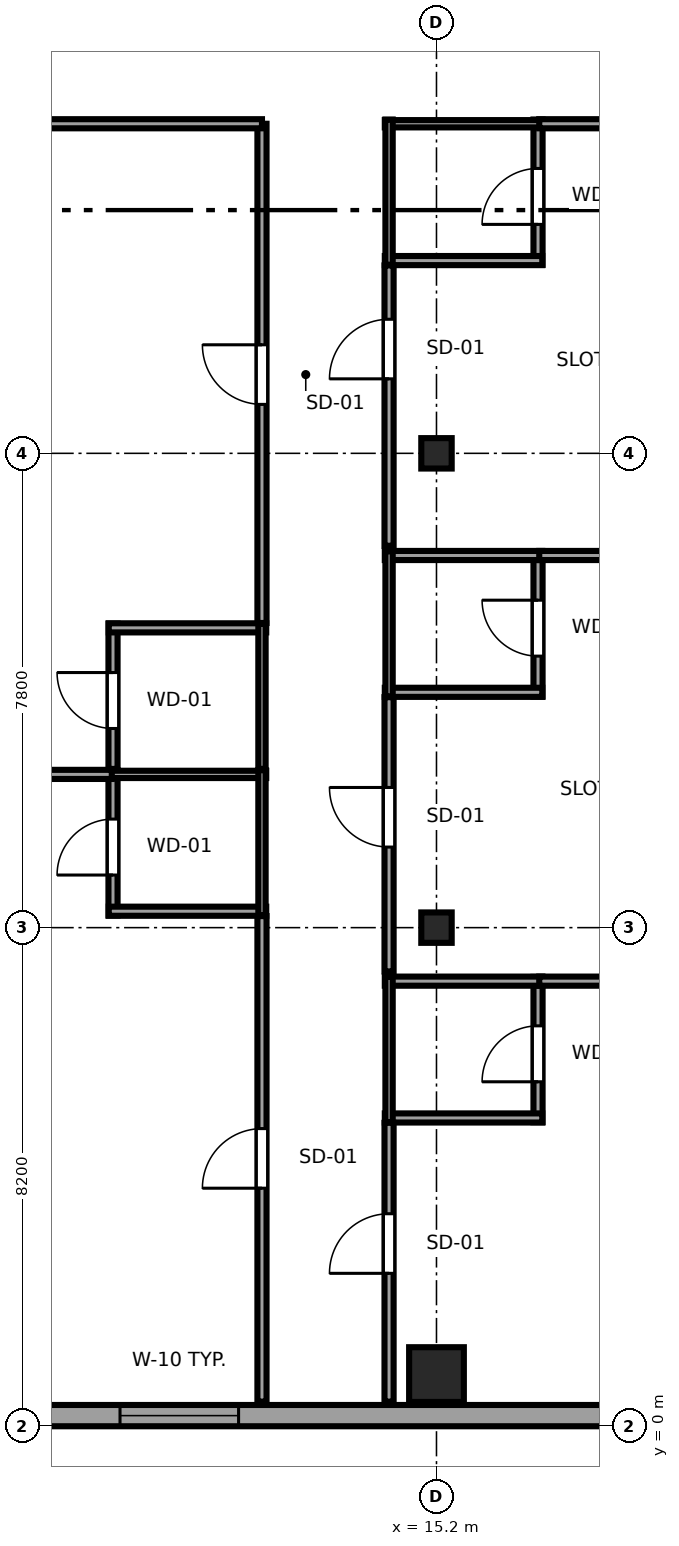
"""IFC4 building model, lengths in metres.
Left out: names, types, materials, properties, quantities, classifications, styles, units other than length and angle.
Written with IfcOpenShell. Run it as: python <this file> out.ifc"""

import sys

from ifc_helpers import new_model, si_unit, direction, frame, frame_2d, origin, origin_2d, place, context, subcontext, project, spatial, rectangle, i_section, extrude, source, transform, mapped, element, fill, save


model = new_model("IFC4")
c1 = context("Model", 3, precision=1e-05, world=origin(), true_north=direction((0.0, 1.0)))
c2 = subcontext(c1, "Body", "Model", "MODEL_VIEW")
j1 = project(units=[si_unit("LENGTHUNIT", "METRE"), si_unit("PLANEANGLEUNIT", "RADIAN")], contexts=[c1])
p1 = place(None, origin())
s1 = spatial("IfcSite", under=j1, at=p1, CompositionType="ELEMENT")
p2 = place(p1, origin())
s2 = spatial("IfcBuilding", under=s1, at=p2, CompositionType="ELEMENT")
p3 = place(p2, frame((0.0, 0.0, 143.5)))
s3 = spatial("IfcBuildingStorey", under=s2, at=p3, CompositionType="ELEMENT", Elevation=143.5)
m1 = source(origin(), c2, "Body", "SweptSolid", [
    extrude(rectangle(XDim=0.9, YDim=0.9, at=origin_2d()), origin(), (0.0, 0.0, 1.0), 3.55),
])
p4 = place(p3, frame((15.2, 0.85, 0.0), z_axis=(0.0, 0.0, 1.0), x_axis=(1.0, 0.0, 0.0)))
e1 = element("IfcColumn", 1, at=p4, inside=s3, PredefinedType="COLUMN", context=c2, shape_type="MappedRepresentation", body=[
    mapped(m1, transform((0.0, 0.0, 0.0), x_axis=(1.0, 0.0, 0.0), y_axis=(0.0, 1.0, 0.0), z_axis=(0.0, 0.0, 1.0), scale=1.0)),
])
m2 = source(origin(), c2, "Body", "SweptSolid", [
    extrude(i_section(OverallWidth=0.5, OverallDepth=0.5, WebThickness=0.022, FlangeThickness=0.034, at=origin_2d()), origin(), (0.0, 0.0, 1.0), 3.55),
])
for number, where, z_axis, x_axis in (
    (2, (15.2, 8.2, 0.0), (0.0, 0.0, 1.0), (1.0, 0.0, 0.0)),
    (3, (15.2, 16.0, 0.0), (0.0, 0.0, 1.0), (1.0, 0.0, 0.0)),
):
    element("IfcColumn", number, at=place(p3, frame(where, z_axis=z_axis, x_axis=x_axis)), inside=s3, PredefinedType="COLUMN", context=c2, shape_type="MappedRepresentation", body=[
        mapped(m2, transform((0.0, 0.0, 0.0), x_axis=(1.0, 0.0, 0.0), y_axis=(0.0, 1.0, 0.0), z_axis=(0.0, 0.0, 1.0), scale=1.0)),
    ])
p5 = place(p3, frame((4.617, 0.175, 0.0), z_axis=(0.0, 0.0, 1.0), x_axis=(1.0, 0.0, 0.0)))
e4 = element("IfcWall", 4, at=p5, inside=s3, PredefinedType="SOLIDWALL", context=c2, shape_type="SweptSolid", body=[
    extrude(rectangle(XDim=18.008, YDim=0.35, at=frame_2d((9.004, 0.0))), origin(), (0.0, 0.0, 1.0), 3.29),
])
p6 = place(p5, frame((5.378, 0.0, 0.68)))
e5 = element("IfcOpeningElement", 5, at=p6, cuts=e4, PredefinedType="OPENING", context=c2, shape_type="SweptSolid", body=[
    extrude(rectangle(XDim=1.95, YDim=1.82, at=frame_2d((0.975, 0.91))), frame((0.0, 0.185, 0.0), z_axis=(0.0, -1.0, 0.0), x_axis=(1.0, 0.0, 0.0)), (0.0, 0.0, 1.0), 0.37),
])
p7 = place(p5, frame((14.332, 0.0, 0.68)))
e6 = element("IfcOpeningElement", 6, at=p7, cuts=e4, PredefinedType="OPENING", context=c2, shape_type="SweptSolid", body=[
    extrude(rectangle(XDim=1.95, YDim=1.82, at=frame_2d((0.975, 0.91))), frame((0.0, 0.185, 0.0), z_axis=(0.0, -1.0, 0.0), x_axis=(1.0, 0.0, 0.0)), (0.0, 0.0, 1.0), 0.37),
])
p8 = place(p3, frame((9.88, 8.4, 0.0), z_axis=(0.0, 0.0, 1.0), x_axis=(0.0, 1.0, 0.0)))
e7 = element("IfcWall", 7, at=p8, inside=s3, PredefinedType="PARTITIONING", context=c2, shape_type="SweptSolid", body=[
    extrude(rectangle(XDim=2.39, YDim=0.15, at=frame_2d((1.195, 0.0))), origin(), (0.0, 0.0, 1.0), 3.29),
])
p9 = place(p8, frame((0.665, 0.0, 0.0)))
e8 = element("IfcOpeningElement", 8, at=p9, cuts=e7, PredefinedType="OPENING", context=c2, shape_type="SweptSolid", body=[
    extrude(rectangle(XDim=0.92, YDim=2.01, at=frame_2d((0.46, 1.005))), frame((0.0, 0.085, 0.0), z_axis=(0.0, -1.0, 0.0), x_axis=(1.0, 0.0, 0.0)), (0.0, 0.0, 1.0), 0.17),
])
p10 = place(p3, frame((9.81, 8.47, 0.0), z_axis=(0.0, 0.0, 1.0), x_axis=(1.0, 0.0, 0.0)))
e9 = element("IfcWall", 9, at=p10, inside=s3, PredefinedType="PARTITIONING", context=c2, shape_type="SweptSolid", body=[
    extrude(rectangle(XDim=2.59, YDim=0.15, at=frame_2d((1.295, 0.0))), origin(), (0.0, 0.0, 1.0), 2.08),
])
p11 = place(p3, frame((9.81, 10.72, 0.0), z_axis=(0.0, 0.0, 1.0), x_axis=(1.0, 0.0, 0.0)))
e10 = element("IfcWall", 10, at=p11, inside=s3, PredefinedType="PLUMBINGWALL", context=c2, shape_type="SweptSolid", body=[
    extrude(rectangle(XDim=2.59, YDim=0.12, at=frame_2d((1.295, 0.0))), origin(), (0.0, 0.0, 1.0), 3.29),
])
p12 = place(p3, frame((12.33, 8.4, 0.0), z_axis=(0.0, 0.0, 1.0), x_axis=(0.0, 1.0, 0.0)))
e11 = element("IfcWall", 11, at=p12, inside=s3, PredefinedType="PLUMBINGWALL", context=c2, shape_type="SweptSolid", body=[
    extrude(rectangle(XDim=2.39, YDim=0.12, at=frame_2d((1.195, 0.0))), origin(), (0.0, 0.0, 1.0), 3.29),
])
p13 = place(p3, frame((9.88, 10.81, 0.0), z_axis=(0.0, 0.0, 1.0), x_axis=(0.0, 1.0, 0.0)))
e12 = element("IfcWall", 12, at=p13, inside=s3, PredefinedType="PARTITIONING", context=c2, shape_type="SweptSolid", body=[
    extrude(rectangle(XDim=2.39, YDim=0.15, at=frame_2d((1.195, 0.0))), origin(), (0.0, 0.0, 1.0), 3.29),
])
p14 = place(p13, frame((0.665, 0.0, 0.0)))
e13 = element("IfcOpeningElement", 13, at=p14, cuts=e12, PredefinedType="OPENING", context=c2, shape_type="SweptSolid", body=[
    extrude(rectangle(XDim=0.92, YDim=2.01, at=frame_2d((0.46, 1.005))), frame((0.0, 0.085, 0.0), z_axis=(0.0, -1.0, 0.0), x_axis=(1.0, 0.0, 0.0)), (0.0, 0.0, 1.0), 0.17),
])
p15 = place(p3, frame((9.81, 13.13, 0.0), z_axis=(0.0, 0.0, 1.0), x_axis=(1.0, 0.0, 0.0)))
e14 = element("IfcWall", 14, at=p15, inside=s3, PredefinedType="PARTITIONING", context=c2, shape_type="SweptSolid", body=[
    extrude(rectangle(XDim=2.59, YDim=0.15, at=frame_2d((1.295, 0.0))), origin(), (0.0, 0.0, 1.0), 3.29),
])
p16 = place(p3, frame((12.33, 10.81, 0.0), z_axis=(0.0, 0.0, 1.0), x_axis=(0.0, 1.0, 0.0)))
e15 = element("IfcWall", 15, at=p16, inside=s3, PredefinedType="PLUMBINGWALL", context=c2, shape_type="SweptSolid", body=[
    extrude(rectangle(XDim=2.39, YDim=0.12, at=frame_2d((1.195, 0.0))), origin(), (0.0, 0.0, 1.0), 3.29),
])
p17 = place(p3, frame((16.87, 5.0, 0.0), z_axis=(0.0, 0.0, 1.0), x_axis=(0.0, 1.0, 0.0)))
e16 = element("IfcWall", 16, at=p17, inside=s3, PredefinedType="PARTITIONING", context=c2, shape_type="SweptSolid", body=[
    extrude(rectangle(XDim=2.39, YDim=0.15, at=frame_2d((1.195, 0.0))), origin(), (0.0, 0.0, 1.0), 3.29),
])
p18 = place(p17, frame((0.665, 0.0, 0.0)))
e17 = element("IfcOpeningElement", 17, at=p18, cuts=e16, PredefinedType="OPENING", context=c2, shape_type="SweptSolid", body=[
    extrude(rectangle(XDim=0.92, YDim=2.01, at=frame_2d((0.46, 1.005))), frame((0.0, 0.085, 0.0), z_axis=(0.0, -1.0, 0.0), x_axis=(1.0, 0.0, 0.0)), (0.0, 0.0, 1.0), 0.17),
])
for number, where, z_axis, x_axis in (
    (18, (14.35, 5.07, 0.0), (0.0, 0.0, 1.0), (1.0, 0.0, 0.0)),
    (19, (14.35, 7.32, 0.0), (0.0, 0.0, 1.0), (1.0, 0.0, 0.0)),
):
    element("IfcWall", number, at=place(p3, frame(where, z_axis=z_axis, x_axis=x_axis)), inside=s3, PredefinedType="PARTITIONING", context=c2, shape_type="SweptSolid", body=[
        extrude(rectangle(XDim=2.59, YDim=0.15, at=frame_2d((1.295, 0.0))), origin(), (0.0, 0.0, 1.0), 3.29),
    ])
p19 = place(p3, frame((14.42, 5.0, 0.0), z_axis=(0.0, 0.0, 1.0), x_axis=(0.0, 1.0, 0.0)))
e20 = element("IfcWall", 20, at=p19, inside=s3, PredefinedType="PLUMBINGWALL", context=c2, shape_type="SweptSolid", body=[
    extrude(rectangle(XDim=2.39, YDim=0.12, at=frame_2d((1.195, 0.0))), origin(), (0.0, 0.0, 1.0), 3.29),
])
p20 = place(p3, frame((16.87, 12.0, 0.0), z_axis=(0.0, 0.0, 1.0), x_axis=(0.0, 1.0, 0.0)))
e21 = element("IfcWall", 21, at=p20, inside=s3, PredefinedType="PARTITIONING", context=c2, shape_type="SweptSolid", body=[
    extrude(rectangle(XDim=2.39, YDim=0.15, at=frame_2d((1.195, 0.0))), origin(), (0.0, 0.0, 1.0), 3.29),
])
p21 = place(p20, frame((0.665, 0.0, 0.0)))
e22 = element("IfcOpeningElement", 22, at=p21, cuts=e21, PredefinedType="OPENING", context=c2, shape_type="SweptSolid", body=[
    extrude(rectangle(XDim=0.92, YDim=2.01, at=frame_2d((0.46, 1.005))), frame((0.0, 0.085, 0.0), z_axis=(0.0, -1.0, 0.0), x_axis=(1.0, 0.0, 0.0)), (0.0, 0.0, 1.0), 0.17),
])
for number, where, z_axis, x_axis in (
    (23, (14.35, 12.07, 0.0), (0.0, 0.0, 1.0), (1.0, 0.0, 0.0)),
    (24, (14.35, 14.32, 0.0), (0.0, 0.0, 1.0), (1.0, 0.0, 0.0)),
):
    element("IfcWall", number, at=place(p3, frame(where, z_axis=z_axis, x_axis=x_axis)), inside=s3, PredefinedType="PARTITIONING", context=c2, shape_type="SweptSolid", body=[
        extrude(rectangle(XDim=2.59, YDim=0.15, at=frame_2d((1.295, 0.0))), origin(), (0.0, 0.0, 1.0), 3.29),
    ])
p22 = place(p3, frame((14.42, 12.0, 0.0), z_axis=(0.0, 0.0, 1.0), x_axis=(0.0, 1.0, 0.0)))
e25 = element("IfcWall", 25, at=p22, inside=s3, PredefinedType="PLUMBINGWALL", context=c2, shape_type="SweptSolid", body=[
    extrude(rectangle(XDim=2.39, YDim=0.12, at=frame_2d((1.195, 0.0))), origin(), (0.0, 0.0, 1.0), 3.29),
])
p23 = place(p3, frame((16.87, 19.1, 0.0), z_axis=(0.0, 0.0, 1.0), x_axis=(0.0, 1.0, 0.0)))
e26 = element("IfcWall", 26, at=p23, inside=s3, PredefinedType="PARTITIONING", context=c2, shape_type="SweptSolid", body=[
    extrude(rectangle(XDim=2.39, YDim=0.15, at=frame_2d((1.195, 0.0))), origin(), (0.0, 0.0, 1.0), 3.29),
])
p24 = place(p23, frame((0.665, 0.0, 0.0)))
e27 = element("IfcOpeningElement", 27, at=p24, cuts=e26, PredefinedType="OPENING", context=c2, shape_type="SweptSolid", body=[
    extrude(rectangle(XDim=0.92, YDim=2.01, at=frame_2d((0.46, 1.005))), frame((0.0, 0.085, 0.0), z_axis=(0.0, -1.0, 0.0), x_axis=(1.0, 0.0, 0.0)), (0.0, 0.0, 1.0), 0.17),
])
p25 = place(p3, frame((14.35, 19.17, 0.0), z_axis=(0.0, 0.0, 1.0), x_axis=(1.0, 0.0, 0.0)))
e28 = element("IfcWall", 28, at=p25, inside=s3, PredefinedType="PARTITIONING", context=c2, shape_type="SweptSolid", body=[
    extrude(rectangle(XDim=2.59, YDim=0.15, at=frame_2d((1.295, 0.0))), origin(), (0.0, 0.0, 1.0), 3.29),
])
p26 = place(p3, frame((14.35, 21.42, 0.0), z_axis=(0.0, 0.0, 1.0), x_axis=(1.0, 0.0, 0.0)))
e29 = element("IfcWall", 29, at=p26, inside=s3, PredefinedType="PLUMBINGWALL", context=c2, shape_type="SweptSolid", body=[
    extrude(rectangle(XDim=2.59, YDim=0.12, at=frame_2d((1.295, 0.0))), origin(), (0.0, 0.0, 1.0), 3.29),
])
p27 = place(p3, frame((14.42, 19.1, 0.0), z_axis=(0.0, 0.0, 1.0), x_axis=(0.0, 1.0, 0.0)))
e30 = element("IfcWall", 30, at=p27, inside=s3, PredefinedType="PLUMBINGWALL", context=c2, shape_type="SweptSolid", body=[
    extrude(rectangle(XDim=2.39, YDim=0.12, at=frame_2d((1.195, 0.0))), origin(), (0.0, 0.0, 1.0), 3.29),
])
p28 = place(p3, frame((12.33, 0.405, 0.0), z_axis=(0.0, 0.0, 1.0), x_axis=(0.0, 1.0, 0.0)))
e31 = element("IfcWall", 31, at=p28, inside=s3, PredefinedType="PARTITIONING", context=c2, shape_type="SweptSolid", body=[
    extrude(rectangle(XDim=7.985, YDim=0.15, at=frame_2d((3.992, 0.0))), origin(), (0.0, 0.0, 1.0), 3.29),
])
p29 = place(p28, frame((3.51, 0.0, 0.0)))
e32 = element("IfcOpeningElement", 32, at=p29, cuts=e31, PredefinedType="OPENING", context=c2, shape_type="SweptSolid", body=[
    extrude(rectangle(XDim=0.98, YDim=2.12, at=frame_2d((0.49, 1.06))), frame((0.0, 0.085, 0.0), z_axis=(0.0, -1.0, 0.0), x_axis=(1.0, 0.0, 0.0)), (0.0, 0.0, 1.0), 0.17),
])
p30 = place(p3, frame((0.405, 10.72, 0.0), z_axis=(0.0, 0.0, 1.0), x_axis=(1.0, 0.0, 0.0)))
e33 = element("IfcWall", 33, at=p30, inside=s3, PredefinedType="PARTITIONING", context=c2, shape_type="SweptSolid", body=[
    extrude(rectangle(XDim=9.455, YDim=0.15, at=frame_2d((4.728, 0.0))), origin(), (0.0, 0.0, 1.0), 3.29),
])
p31 = place(p3, frame((12.33, 13.21, 0.0), z_axis=(0.0, 0.0, 1.0), x_axis=(0.0, 1.0, 0.0)))
e34 = element("IfcWall", 34, at=p31, inside=s3, PredefinedType="PARTITIONING", context=c2, shape_type="SweptSolid", body=[
    extrude(rectangle(XDim=8.21, YDim=0.15, at=frame_2d((4.105, 0.0))), origin(), (0.0, 0.0, 1.0), 3.29),
])
p32 = place(p31, frame((3.595, 0.0, 0.0)))
e35 = element("IfcOpeningElement", 35, at=p32, cuts=e34, PredefinedType="OPENING", context=c2, shape_type="SweptSolid", body=[
    extrude(rectangle(XDim=0.98, YDim=2.12, at=frame_2d((0.49, 1.06))), frame((0.0, 0.085, 0.0), z_axis=(0.0, -1.0, 0.0), x_axis=(1.0, 0.0, 0.0)), (0.0, 0.0, 1.0), 0.17),
])
p33 = place(p3, frame((0.405, 21.42, 0.0), z_axis=(0.0, 0.0, 1.0), x_axis=(1.0, 0.0, 0.0)))
e36 = element("IfcWall", 36, at=p33, inside=s3, PredefinedType="PARTITIONING", context=c2, shape_type="SweptSolid", body=[
    extrude(rectangle(XDim=11.925, YDim=0.15, at=frame_2d((5.962, 0.0))), origin(), (0.0, 0.0, 1.0), 3.29),
])
p34 = place(p3, frame((14.42, 0.405, 0.0), z_axis=(0.0, 0.0, 1.0), x_axis=(0.0, 1.0, 0.0)))
e37 = element("IfcWall", 37, at=p34, inside=s3, PredefinedType="PARTITIONING", context=c2, shape_type="SweptSolid", body=[
    extrude(rectangle(XDim=4.585, YDim=0.15, at=frame_2d((2.292, 0.0))), origin(), (0.0, 0.0, 1.0), 3.29),
])
p35 = place(p34, frame((2.11, 0.0, 0.0)))
e38 = element("IfcOpeningElement", 38, at=p35, cuts=e37, PredefinedType="OPENING", context=c2, shape_type="SweptSolid", body=[
    extrude(rectangle(XDim=0.98, YDim=2.12, at=frame_2d((0.49, 1.06))), frame((0.0, 0.085, 0.0), z_axis=(0.0, -1.0, 0.0), x_axis=(1.0, 0.0, 0.0)), (0.0, 0.0, 1.0), 0.17),
])
p36 = place(p3, frame((16.89, 7.32, 0.0), z_axis=(0.0, 0.0, 1.0), x_axis=(1.0, 0.0, 0.0)))
e39 = element("IfcWall", 39, at=p36, inside=s3, PredefinedType="PARTITIONING", context=c2, shape_type="SweptSolid", body=[
    extrude(rectangle(XDim=5.46, YDim=0.15, at=frame_2d((2.73, 0.0))), origin(), (0.0, 0.0, 1.0), 3.29),
])
p37 = place(p3, frame((14.42, 7.48, 0.0), z_axis=(0.0, 0.0, 1.0), x_axis=(0.0, 1.0, 0.0)))
e40 = element("IfcWall", 40, at=p37, inside=s3, PredefinedType="PARTITIONING", context=c2, shape_type="SweptSolid", body=[
    extrude(rectangle(XDim=4.51, YDim=0.15, at=frame_2d((2.255, 0.0))), origin(), (0.0, 0.0, 1.0), 3.29),
])
p38 = place(p37, frame((2.045, 0.0, 0.0)))
e41 = element("IfcOpeningElement", 41, at=p38, cuts=e40, PredefinedType="OPENING", context=c2, shape_type="SweptSolid", body=[
    extrude(rectangle(XDim=0.98, YDim=2.12, at=frame_2d((0.49, 1.06))), frame((0.0, 0.085, 0.0), z_axis=(0.0, -1.0, 0.0), x_axis=(1.0, 0.0, 0.0)), (0.0, 0.0, 1.0), 0.17),
])
p39 = place(p3, frame((16.89, 14.32, 0.0), z_axis=(0.0, 0.0, 1.0), x_axis=(1.0, 0.0, 0.0)))
e42 = element("IfcWall", 42, at=p39, inside=s3, PredefinedType="PARTITIONING", context=c2, shape_type="SweptSolid", body=[
    extrude(rectangle(XDim=5.46, YDim=0.15, at=frame_2d((2.73, 0.0))), origin(), (0.0, 0.0, 1.0), 3.29),
])
p40 = place(p3, frame((14.42, 14.48, 0.0), z_axis=(0.0, 0.0, 1.0), x_axis=(0.0, 1.0, 0.0)))
e43 = element("IfcWall", 43, at=p40, inside=s3, PredefinedType="PARTITIONING", context=c2, shape_type="SweptSolid", body=[
    extrude(rectangle(XDim=4.61, YDim=0.15, at=frame_2d((2.305, 0.0))), origin(), (0.0, 0.0, 1.0), 3.29),
])
p41 = place(p40, frame((2.745, 0.0, 0.0)))
e44 = element("IfcOpeningElement", 44, at=p41, cuts=e43, PredefinedType="OPENING", context=c2, shape_type="SweptSolid", body=[
    extrude(rectangle(XDim=0.98, YDim=2.12, at=frame_2d((0.49, 1.06))), frame((0.0, 0.085, 0.0), z_axis=(0.0, -1.0, 0.0), x_axis=(1.0, 0.0, 0.0)), (0.0, 0.0, 1.0), 0.17),
])
p42 = place(p3, frame((16.89, 21.42, 0.0), z_axis=(0.0, 0.0, 1.0), x_axis=(1.0, 0.0, 0.0)))
e45 = element("IfcWall", 45, at=p42, inside=s3, PredefinedType="PARTITIONING", context=c2, shape_type="SweptSolid", body=[
    extrude(rectangle(XDim=5.46, YDim=0.15, at=frame_2d((2.73, 0.0))), origin(), (0.0, 0.0, 1.0), 3.29),
])
m3 = source(origin(), c2, "Body", "SweptSolid", [
    extrude(rectangle(XDim=1.95, YDim=1.82, at=frame_2d((0.975, 0.91))), frame((0.0, 0.09, 0.0), z_axis=(0.0, -1.0, 0.0), x_axis=(1.0, 0.0, 0.0)), (0.0, 0.0, 1.0), 0.06),
])
p43 = place(p6, origin())
e46 = element("IfcWindow", 46, at=p43, inside=s3, PartitioningType="DOUBLE_PANEL_VERTICAL", PredefinedType="WINDOW", context=c2, shape_type="MappedRepresentation", body=[
    mapped(m3, transform((0.0, 0.0, 0.0), x_axis=(1.0, 0.0, 0.0), y_axis=(0.0, 1.0, 0.0), z_axis=(0.0, 0.0, 1.0), scale=1.0)),
])
fill(e5, e46)
m4 = source(origin(), c2, "Body", "SweptSolid", [
    extrude(rectangle(XDim=0.92, YDim=2.01, at=frame_2d((0.46, 1.005))), frame((0.0, 0.025, 0.0), z_axis=(0.0, -1.0, 0.0), x_axis=(1.0, 0.0, 0.0)), (0.0, 0.0, 1.0), 0.05),
])
p44 = place(p9, origin())
e47 = element("IfcDoor", 47, at=p44, inside=s3, OperationType="SINGLE_SWING_LEFT", PredefinedType="DOOR", context=c2, shape_type="MappedRepresentation", body=[
    mapped(m4, transform((0.0, 0.0, 0.0), x_axis=(1.0, 0.0, 0.0), y_axis=(0.0, 1.0, 0.0), z_axis=(0.0, 0.0, 1.0), scale=1.0)),
])
fill(e8, e47)
p45 = place(p14, origin())
e48 = element("IfcDoor", 48, at=p45, inside=s3, OperationType="SINGLE_SWING_RIGHT", PredefinedType="DOOR", context=c2, shape_type="MappedRepresentation", body=[
    mapped(m4, transform((0.0, 0.0, 0.0), x_axis=(1.0, 0.0, 0.0), y_axis=(0.0, 1.0, 0.0), z_axis=(0.0, 0.0, 1.0), scale=1.0)),
])
fill(e13, e48)
p46 = place(p18, origin())
e49 = element("IfcDoor", 49, at=p46, inside=s3, OperationType="SINGLE_SWING_LEFT", PredefinedType="DOOR", context=c2, shape_type="MappedRepresentation", body=[
    mapped(m4, transform((0.0, 0.0, 0.0), x_axis=(1.0, 0.0, 0.0), y_axis=(0.0, 1.0, 0.0), z_axis=(0.0, 0.0, 1.0), scale=1.0)),
])
fill(e17, e49)
p47 = place(p21, origin())
e50 = element("IfcDoor", 50, at=p47, inside=s3, OperationType="SINGLE_SWING_RIGHT", PredefinedType="DOOR", context=c2, shape_type="MappedRepresentation", body=[
    mapped(m4, transform((0.0, 0.0, 0.0), x_axis=(1.0, 0.0, 0.0), y_axis=(0.0, 1.0, 0.0), z_axis=(0.0, 0.0, 1.0), scale=1.0)),
])
fill(e22, e50)
p48 = place(p24, origin())
e51 = element("IfcDoor", 51, at=p48, inside=s3, OperationType="SINGLE_SWING_LEFT", PredefinedType="DOOR", context=c2, shape_type="MappedRepresentation", body=[
    mapped(m4, transform((0.0, 0.0, 0.0), x_axis=(1.0, 0.0, 0.0), y_axis=(0.0, 1.0, 0.0), z_axis=(0.0, 0.0, 1.0), scale=1.0)),
])
fill(e27, e51)
m5 = source(origin(), c2, "Body", "SweptSolid", [
    extrude(rectangle(XDim=0.98, YDim=2.12, at=frame_2d((0.49, 1.06))), frame((0.0, 0.025, 0.0), z_axis=(0.0, -1.0, 0.0), x_axis=(1.0, 0.0, 0.0)), (0.0, 0.0, 1.0), 0.05),
])
p49 = place(p29, origin())
e52 = element("IfcDoor", 52, at=p49, inside=s3, OperationType="SINGLE_SWING_LEFT", PredefinedType="DOOR", context=c2, shape_type="MappedRepresentation", body=[
    mapped(m5, transform((0.0, 0.0, 0.0), x_axis=(1.0, 0.0, 0.0), y_axis=(0.0, 1.0, 0.0), z_axis=(0.0, 0.0, 1.0), scale=1.0)),
])
fill(e32, e52)
p50 = place(p32, origin())
e53 = element("IfcDoor", 53, at=p50, inside=s3, OperationType="SINGLE_SWING_RIGHT", PredefinedType="DOOR", context=c2, shape_type="MappedRepresentation", body=[
    mapped(m5, transform((0.0, 0.0, 0.0), x_axis=(1.0, 0.0, 0.0), y_axis=(0.0, 1.0, 0.0), z_axis=(0.0, 0.0, 1.0), scale=1.0)),
])
fill(e35, e53)
p51 = place(p35, origin())
e54 = element("IfcDoor", 54, at=p51, inside=s3, OperationType="SINGLE_SWING_LEFT", PredefinedType="DOOR", context=c2, shape_type="MappedRepresentation", body=[
    mapped(m5, transform((0.0, 0.0, 0.0), x_axis=(1.0, 0.0, 0.0), y_axis=(0.0, 1.0, 0.0), z_axis=(0.0, 0.0, 1.0), scale=1.0)),
])
fill(e38, e54)
p52 = place(p38, origin())
e55 = element("IfcDoor", 55, at=p52, inside=s3, OperationType="SINGLE_SWING_RIGHT", PredefinedType="DOOR", context=c2, shape_type="MappedRepresentation", body=[
    mapped(m5, transform((0.0, 0.0, 0.0), x_axis=(1.0, 0.0, 0.0), y_axis=(0.0, 1.0, 0.0), z_axis=(0.0, 0.0, 1.0), scale=1.0)),
])
fill(e41, e55)
p53 = place(p41, origin())
e56 = element("IfcDoor", 56, at=p53, inside=s3, OperationType="SINGLE_SWING_LEFT", PredefinedType="DOOR", context=c2, shape_type="MappedRepresentation", body=[
    mapped(m5, transform((0.0, 0.0, 0.0), x_axis=(1.0, 0.0, 0.0), y_axis=(0.0, 1.0, 0.0), z_axis=(0.0, 0.0, 1.0), scale=1.0)),
])
fill(e44, e56)
save(model, sys.argv[1])
